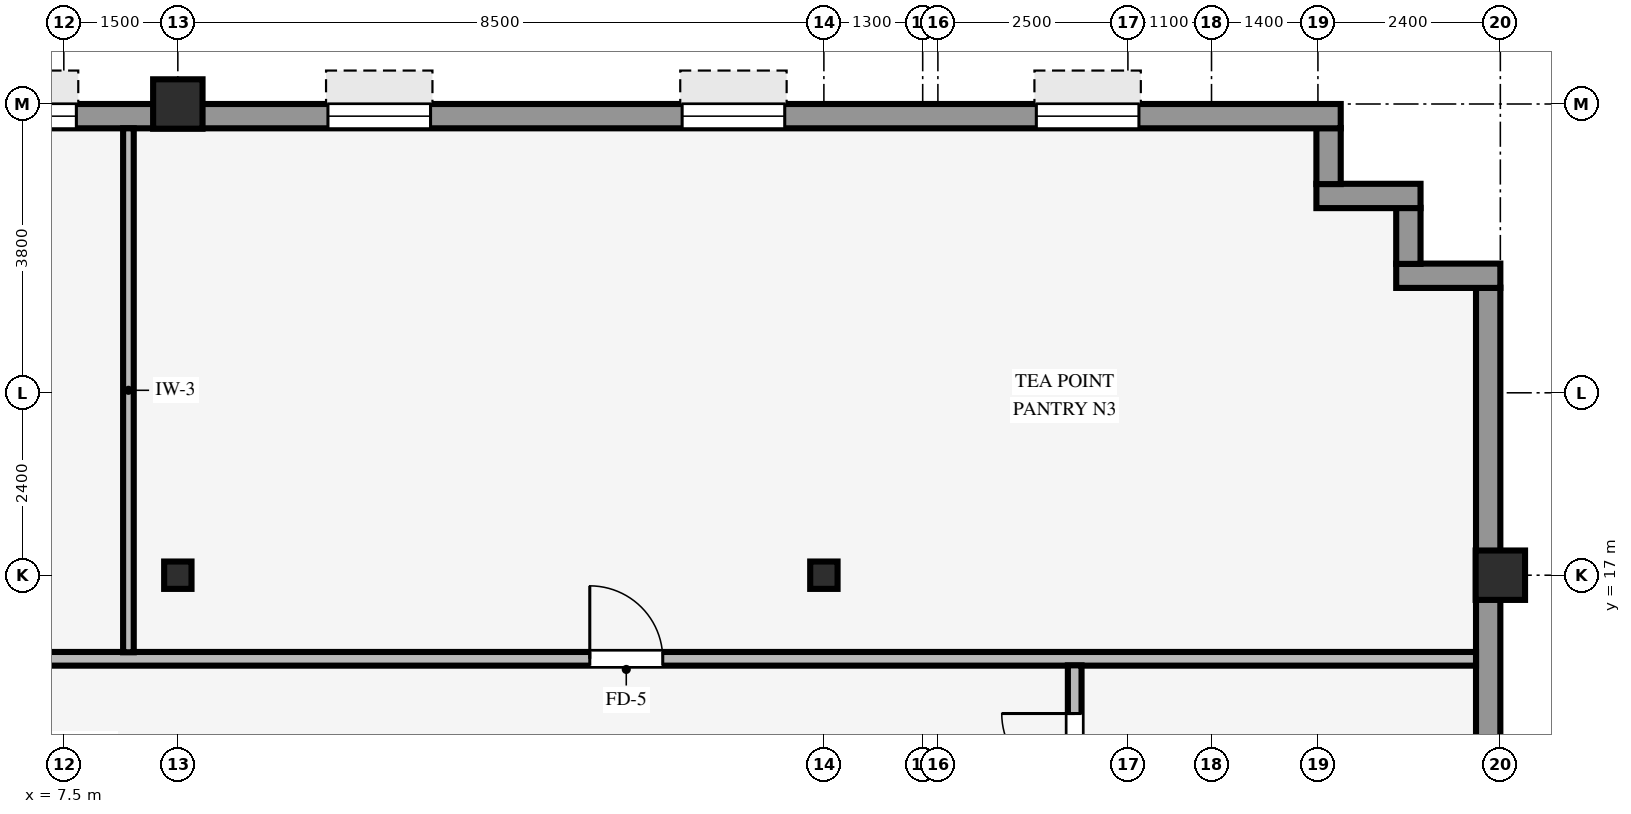
"""IFC4 building model, lengths in metres.
Left out: names, types, materials, properties, quantities, classifications, styles, units other than length and angle.
Written with IfcOpenShell. Run it as: python <this file> out.ifc"""

import sys

from ifc_helpers import new_model, si_unit, direction, frame, frame_2d, origin, origin_2d, place, context, subcontext, project, spatial, rectangle, hollow_rectangle, i_section, extrude, source, transform, mapped, element, fill, save


model = new_model("IFC4")
c1 = context("Model", 3, precision=1e-05, world=origin(), true_north=direction((0.0, 1.0)))
c2 = subcontext(c1, "Body", "Model", "MODEL_VIEW")
j1 = project(units=[si_unit("LENGTHUNIT", "METRE"), si_unit("PLANEANGLEUNIT", "RADIAN")], contexts=[c1])
p1 = place(None, origin())
s1 = spatial("IfcSite", under=j1, at=p1, CompositionType="ELEMENT")
p2 = place(p1, origin())
s2 = spatial("IfcBuilding", under=s1, at=p2, CompositionType="ELEMENT")
p3 = place(p2, frame((0.0, 0.0, 156.7)))
s3 = spatial("IfcBuildingStorey", under=s2, at=p3, CompositionType="ELEMENT", Elevation=156.7)
for number, where, z_axis, x_axis in (
    (1, (26.4, 17.0, 0.0), (0.0, 0.0, 1.0), (1.0, 0.0, 0.0)),
    (2, (9.0, 23.2, 0.0), (0.0, 0.0, 1.0), (1.0, 0.0, 0.0)),
):
    element("IfcColumn", number, at=place(p3, frame(where, z_axis=z_axis, x_axis=x_axis)), inside=s3, PredefinedType="COLUMN", context=c2, shape_type="SweptSolid", body=[
        extrude(hollow_rectangle(XDim=0.65, YDim=0.65, WallThickness=0.04, InnerFilletRadius=0.04, OuterFilletRadius=0.08, at=origin_2d()), origin(), (0.0, 0.0, 1.0), 3.37),
    ])
for number, where, z_axis, x_axis in (
    (3, (9.0, 17.0, 0.0), (0.0, 0.0, 1.0), (1.0, 0.0, 0.0)),
    (4, (17.5, 17.0, 0.0), (0.0, 0.0, 1.0), (1.0, 0.0, 0.0)),
):
    element("IfcColumn", number, at=place(p3, frame(where, z_axis=z_axis, x_axis=x_axis)), inside=s3, PredefinedType="COLUMN", context=c2, shape_type="SweptSolid", body=[
        extrude(i_section(OverallWidth=0.36, OverallDepth=0.36, WebThickness=0.021, FlangeThickness=0.021, FilletRadius=0.018, at=origin_2d()), origin(), (0.0, 0.0, 1.0), 3.37),
    ])
p4 = place(p3, frame((26.24, -20.784, 0.0), z_axis=(0.0, 0.0, 1.0), x_axis=(0.0, 1.0, 0.0)))
e5 = element("IfcWall", 5, at=p4, inside=s3, PredefinedType="STANDARD", context=c2, shape_type="SweptSolid", body=[
    extrude(rectangle(XDim=41.568, YDim=0.32, at=frame_2d((20.784, 0.0))), origin(), (0.0, 0.0, 1.0), 2.705),
])
p5 = place(p4, frame((7.369, 0.0, 0.8)))
e6 = element("IfcOpeningElement", 6, at=p5, cuts=e5, PredefinedType="OPENING", context=c2, shape_type="SweptSolid", body=[
    extrude(rectangle(XDim=2.1, YDim=1.56, at=frame_2d((1.05, 0.78))), frame((0.0, 0.17, 0.0), z_axis=(0.0, -1.0, 0.0), x_axis=(1.0, 0.0, 0.0)), (0.0, 0.0, 1.0), 0.34),
])
p6 = place(p4, frame((12.315, 0.0, 0.8)))
e7 = element("IfcOpeningElement", 7, at=p6, cuts=e5, PredefinedType="OPENING", context=c2, shape_type="SweptSolid", body=[
    extrude(rectangle(XDim=2.1, YDim=1.56, at=frame_2d((1.05, 0.78))), frame((0.0, 0.17, 0.0), z_axis=(0.0, -1.0, 0.0), x_axis=(1.0, 0.0, 0.0)), (0.0, 0.0, 1.0), 0.34),
])
p7 = place(p4, frame((17.261, 0.0, 0.8)))
e8 = element("IfcOpeningElement", 8, at=p7, cuts=e5, PredefinedType="OPENING", context=c2, shape_type="SweptSolid", body=[
    extrude(rectangle(XDim=2.1, YDim=1.56, at=frame_2d((1.05, 0.78))), frame((0.0, 0.17, 0.0), z_axis=(0.0, -1.0, 0.0), x_axis=(1.0, 0.0, 0.0)), (0.0, 0.0, 1.0), 0.34),
])
p8 = place(p4, frame((22.207, 0.0, 0.8)))
e9 = element("IfcOpeningElement", 9, at=p8, cuts=e5, PredefinedType="OPENING", context=c2, shape_type="SweptSolid", body=[
    extrude(rectangle(XDim=2.1, YDim=1.56, at=frame_2d((1.05, 0.78))), frame((0.0, 0.17, 0.0), z_axis=(0.0, -1.0, 0.0), x_axis=(1.0, 0.0, 0.0)), (0.0, 0.0, 1.0), 0.34),
])
p9 = place(p4, frame((27.153, 0.0, 0.8)))
e10 = element("IfcOpeningElement", 10, at=p9, cuts=e5, PredefinedType="OPENING", context=c2, shape_type="SweptSolid", body=[
    extrude(rectangle(XDim=2.1, YDim=1.56, at=frame_2d((1.05, 0.78))), frame((0.0, 0.17, 0.0), z_axis=(0.0, -1.0, 0.0), x_axis=(1.0, 0.0, 0.0)), (0.0, 0.0, 1.0), 0.34),
])
p10 = place(p4, frame((32.099, 0.0, 0.8)))
e11 = element("IfcOpeningElement", 11, at=p10, cuts=e5, PredefinedType="OPENING", context=c2, shape_type="SweptSolid", body=[
    extrude(rectangle(XDim=2.1, YDim=1.56, at=frame_2d((1.05, 0.78))), frame((0.0, 0.17, 0.0), z_axis=(0.0, -1.0, 0.0), x_axis=(1.0, 0.0, 0.0)), (0.0, 0.0, 1.0), 0.34),
])
p11 = place(p3, frame((25.03, 20.94, 0.0), z_axis=(0.0, 0.0, 1.0), x_axis=(1.0, 0.0, 0.0)))
e12 = element("IfcWall", 12, at=p11, inside=s3, PredefinedType="STANDARD", context=c2, shape_type="SweptSolid", body=[
    extrude(rectangle(XDim=1.37, YDim=0.32, at=frame_2d((0.685, 0.0))), origin(), (0.0, 0.0, 1.0), 3.36),
])
p12 = place(p3, frame((25.19, 21.096, 0.0), z_axis=(0.0, 0.0, 1.0), x_axis=(0.0, 1.0, 0.0)))
e13 = element("IfcWall", 13, at=p12, inside=s3, PredefinedType="STANDARD", context=c2, shape_type="SweptSolid", body=[
    extrude(rectangle(XDim=0.738, YDim=0.32, at=frame_2d((0.369, 0.0))), origin(), (0.0, 0.0, 1.0), 3.36),
])
p13 = place(p3, frame((23.98, 21.99, 0.0), z_axis=(0.0, 0.0, 1.0), x_axis=(1.0, 0.0, 0.0)))
e14 = element("IfcWall", 14, at=p13, inside=s3, PredefinedType="STANDARD", context=c2, shape_type="SweptSolid", body=[
    extrude(rectangle(XDim=1.37, YDim=0.32, at=frame_2d((0.685, 0.0))), origin(), (0.0, 0.0, 1.0), 3.36),
])
p14 = place(p3, frame((24.14, 22.146, 0.0), z_axis=(0.0, 0.0, 1.0), x_axis=(0.0, 1.0, 0.0)))
e15 = element("IfcWall", 15, at=p14, inside=s3, PredefinedType="STANDARD", context=c2, shape_type="SweptSolid", body=[
    extrude(rectangle(XDim=0.738, YDim=0.32, at=frame_2d((0.369, 0.0))), origin(), (0.0, 0.0, 1.0), 3.36),
])
p15 = place(p3, frame((-24.3, 23.04, 0.0), z_axis=(0.0, 0.0, 1.0), x_axis=(1.0, 0.0, 0.0)))
e16 = element("IfcWall", 16, at=p15, inside=s3, PredefinedType="STANDARD", context=c2, shape_type="SweptSolid", body=[
    extrude(rectangle(XDim=48.6, YDim=0.32, at=frame_2d((24.3, 0.0))), origin(), (0.0, 0.0, 1.0), 2.705),
])
p16 = place(p15, frame((2.655, 0.0, 0.8)))
e17 = element("IfcOpeningElement", 17, at=p16, cuts=e16, PredefinedType="OPENING", context=c2, shape_type="SweptSolid", body=[
    extrude(rectangle(XDim=1.35, YDim=1.56, at=frame_2d((0.675, 0.78))), frame((0.0, 0.17, 0.0), z_axis=(0.0, -1.0, 0.0), x_axis=(1.0, 0.0, 0.0)), (0.0, 0.0, 1.0), 0.34),
])
p17 = place(p15, frame((7.315, 0.0, 0.8)))
e18 = element("IfcOpeningElement", 18, at=p17, cuts=e16, PredefinedType="OPENING", context=c2, shape_type="SweptSolid", body=[
    extrude(rectangle(XDim=1.35, YDim=1.56, at=frame_2d((0.675, 0.78))), frame((0.0, 0.17, 0.0), z_axis=(0.0, -1.0, 0.0), x_axis=(1.0, 0.0, 0.0)), (0.0, 0.0, 1.0), 0.34),
])
p18 = place(p15, frame((11.975, 0.0, 0.8)))
e19 = element("IfcOpeningElement", 19, at=p18, cuts=e16, PredefinedType="OPENING", context=c2, shape_type="SweptSolid", body=[
    extrude(rectangle(XDim=1.35, YDim=1.56, at=frame_2d((0.675, 0.78))), frame((0.0, 0.17, 0.0), z_axis=(0.0, -1.0, 0.0), x_axis=(1.0, 0.0, 0.0)), (0.0, 0.0, 1.0), 0.34),
])
p19 = place(p15, frame((16.185, 0.0, 0.8)))
e20 = element("IfcOpeningElement", 20, at=p19, cuts=e16, PredefinedType="OPENING", context=c2, shape_type="SweptSolid", body=[
    extrude(rectangle(XDim=1.35, YDim=1.56, at=frame_2d((0.675, 0.78))), frame((0.0, 0.17, 0.0), z_axis=(0.0, -1.0, 0.0), x_axis=(1.0, 0.0, 0.0)), (0.0, 0.0, 1.0), 0.34),
])
p20 = place(p15, frame((21.295, 0.0, 0.8)))
e21 = element("IfcOpeningElement", 21, at=p20, cuts=e16, PredefinedType="OPENING", context=c2, shape_type="SweptSolid", body=[
    extrude(rectangle(XDim=1.35, YDim=1.56, at=frame_2d((0.675, 0.78))), frame((0.0, 0.17, 0.0), z_axis=(0.0, -1.0, 0.0), x_axis=(1.0, 0.0, 0.0)), (0.0, 0.0, 1.0), 0.34),
])
p21 = place(p15, frame((25.955, 0.0, 0.8)))
e22 = element("IfcOpeningElement", 22, at=p21, cuts=e16, PredefinedType="OPENING", context=c2, shape_type="SweptSolid", body=[
    extrude(rectangle(XDim=1.35, YDim=1.56, at=frame_2d((0.675, 0.78))), frame((0.0, 0.17, 0.0), z_axis=(0.0, -1.0, 0.0), x_axis=(1.0, 0.0, 0.0)), (0.0, 0.0, 1.0), 0.34),
])
p22 = place(p15, frame((30.615, 0.0, 0.8)))
e23 = element("IfcOpeningElement", 23, at=p22, cuts=e16, PredefinedType="OPENING", context=c2, shape_type="SweptSolid", body=[
    extrude(rectangle(XDim=1.35, YDim=1.56, at=frame_2d((0.675, 0.78))), frame((0.0, 0.17, 0.0), z_axis=(0.0, -1.0, 0.0), x_axis=(1.0, 0.0, 0.0)), (0.0, 0.0, 1.0), 0.34),
])
p23 = place(p15, frame((35.275, 0.0, 0.8)))
e24 = element("IfcOpeningElement", 24, at=p23, cuts=e16, PredefinedType="OPENING", context=c2, shape_type="SweptSolid", body=[
    extrude(rectangle(XDim=1.35, YDim=1.56, at=frame_2d((0.675, 0.78))), frame((0.0, 0.17, 0.0), z_axis=(0.0, -1.0, 0.0), x_axis=(1.0, 0.0, 0.0)), (0.0, 0.0, 1.0), 0.34),
])
p24 = place(p15, frame((39.935, 0.0, 0.8)))
e25 = element("IfcOpeningElement", 25, at=p24, cuts=e16, PredefinedType="OPENING", context=c2, shape_type="SweptSolid", body=[
    extrude(rectangle(XDim=1.35, YDim=1.56, at=frame_2d((0.675, 0.78))), frame((0.0, 0.17, 0.0), z_axis=(0.0, -1.0, 0.0), x_axis=(1.0, 0.0, 0.0)), (0.0, 0.0, 1.0), 0.34),
])
p25 = place(p15, frame((44.595, 0.0, 0.8)))
e26 = element("IfcOpeningElement", 26, at=p25, cuts=e16, PredefinedType="OPENING", context=c2, shape_type="SweptSolid", body=[
    extrude(rectangle(XDim=1.35, YDim=1.56, at=frame_2d((0.675, 0.78))), frame((0.0, 0.17, 0.0), z_axis=(0.0, -1.0, 0.0), x_axis=(1.0, 0.0, 0.0)), (0.0, 0.0, 1.0), 0.34),
])
p26 = place(p3, frame((-26.08, 15.9, 0.0), z_axis=(0.0, 0.0, 1.0), x_axis=(1.0, 0.0, 0.0)))
e27 = element("IfcWall", 27, at=p26, inside=s3, PredefinedType="PARTITIONING", context=c2, shape_type="SweptSolid", body=[
    extrude(rectangle(XDim=52.16, YDim=0.18, at=frame_2d((26.08, 0.0))), origin(), (0.0, 0.0, 1.0), 3.36),
])
p27 = place(p26, frame((26.72, 0.0, 0.0)))
e28 = element("IfcOpeningElement", 28, at=p27, cuts=e27, PredefinedType="OPENING", context=c2, shape_type="SweptSolid", body=[
    extrude(rectangle(XDim=0.96, YDim=2.1, at=frame_2d((0.48, 1.05))), frame((0.0, 0.1, 0.0), z_axis=(0.0, -1.0, 0.0), x_axis=(1.0, 0.0, 0.0)), (0.0, 0.0, 1.0), 0.2),
])
p28 = place(p26, frame((40.5, 0.0, 0.0)))
e29 = element("IfcOpeningElement", 29, at=p28, cuts=e27, PredefinedType="OPENING", context=c2, shape_type="SweptSolid", body=[
    extrude(rectangle(XDim=0.96, YDim=2.1, at=frame_2d((0.48, 1.05))), frame((0.0, 0.1, 0.0), z_axis=(0.0, -1.0, 0.0), x_axis=(1.0, 0.0, 0.0)), (0.0, 0.0, 1.0), 0.2),
])
p29 = place(p26, frame((13.61, 0.0, 0.0)))
e30 = element("IfcOpeningElement", 30, at=p29, cuts=e27, PredefinedType="OPENING", context=c2, shape_type="SweptSolid", body=[
    extrude(rectangle(XDim=0.96, YDim=2.1, at=frame_2d((0.48, 1.05))), frame((0.0, 0.1, 0.0), z_axis=(0.0, -1.0, 0.0), x_axis=(1.0, 0.0, 0.0)), (0.0, 0.0, 1.0), 0.2),
])
p30 = place(p3, frame((8.35, 15.986, 0.0), z_axis=(0.0, 0.0, 1.0), x_axis=(0.0, 1.0, 0.0)))
e31 = element("IfcWall", 31, at=p30, inside=s3, PredefinedType="PARTITIONING", context=c2, shape_type="SweptSolid", body=[
    extrude(rectangle(XDim=6.894, YDim=0.14, at=frame_2d((3.447, 0.0))), origin(), (0.0, 0.0, 1.0), 3.36),
])
p31 = place(p3, frame((20.8, 13.586, 0.0), z_axis=(0.0, 0.0, 1.0), x_axis=(0.0, 1.0, 0.0)))
e32 = element("IfcWall", 32, at=p31, inside=s3, PredefinedType="PARTITIONING", context=c2, shape_type="SweptSolid", body=[
    extrude(rectangle(XDim=2.228, YDim=0.18, at=frame_2d((1.114, 0.0))), origin(), (0.0, 0.0, 1.0), 3.36),
])
p32 = place(p31, frame((0.634, 0.0, 0.0)))
e33 = element("IfcOpeningElement", 33, at=p32, cuts=e32, PredefinedType="OPENING", context=c2, shape_type="SweptSolid", body=[
    extrude(rectangle(XDim=0.96, YDim=2.1, at=frame_2d((0.48, 1.05))), frame((0.0, 0.1, 0.0), z_axis=(0.0, -1.0, 0.0), x_axis=(1.0, 0.0, 0.0)), (0.0, 0.0, 1.0), 0.2),
])
m1 = source(origin(), c2, "Body", "SweptSolid", [
    extrude(rectangle(XDim=1.35, YDim=1.56, at=frame_2d((0.675, 0.78))), frame((0.0, 0.03, 0.0), z_axis=(0.0, -1.0, 0.0), x_axis=(1.0, 0.0, 0.0)), (0.0, 0.0, 1.0), 0.06),
])
p33 = place(p22, origin())
e34 = element("IfcWindow", 34, at=p33, inside=s3, PartitioningType="SINGLE_PANEL", PredefinedType="WINDOW", context=c2, shape_type="MappedRepresentation", body=[
    mapped(m1, transform((0.0, 0.0, 0.0), scale=1.0)),
])
fill(e23, e34)
p34 = place(p23, origin())
e35 = element("IfcWindow", 35, at=p34, inside=s3, PartitioningType="SINGLE_PANEL", PredefinedType="WINDOW", context=c2, shape_type="MappedRepresentation", body=[
    mapped(m1, transform((0.0, 0.0, 0.0), scale=1.0)),
])
fill(e24, e35)
p35 = place(p24, origin())
e36 = element("IfcWindow", 36, at=p35, inside=s3, PartitioningType="SINGLE_PANEL", PredefinedType="WINDOW", context=c2, shape_type="MappedRepresentation", body=[
    mapped(m1, transform((0.0, 0.0, 0.0), scale=1.0)),
])
fill(e25, e36)
p36 = place(p25, origin())
e37 = element("IfcWindow", 37, at=p36, inside=s3, PartitioningType="SINGLE_PANEL", PredefinedType="WINDOW", context=c2, shape_type="MappedRepresentation", body=[
    mapped(m1, transform((0.0, 0.0, 0.0), scale=1.0)),
])
fill(e26, e37)
m2 = source(origin(), c2, "Body", "SweptSolid", [
    extrude(rectangle(XDim=0.96, YDim=2.1, at=frame_2d((0.48, 1.05))), frame((0.0, 0.025, 0.0), z_axis=(0.0, -1.0, 0.0), x_axis=(1.0, 0.0, 0.0)), (0.0, 0.0, 1.0), 0.05),
])
p37 = place(p28, origin())
e38 = element("IfcDoor", 38, at=p37, inside=s3, OperationType="SINGLE_SWING_LEFT", PredefinedType="DOOR", context=c2, shape_type="MappedRepresentation", body=[
    mapped(m2, transform((0.0, 0.0, 0.0), scale=1.0)),
])
fill(e29, e38)
p38 = place(p32, origin())
e39 = element("IfcDoor", 39, at=p38, inside=s3, OperationType="SINGLE_SWING_RIGHT", PredefinedType="DOOR", context=c2, shape_type="MappedRepresentation", body=[
    mapped(m2, transform((0.0, 0.0, 0.0), scale=1.0)),
])
fill(e33, e39)
save(model, sys.argv[1])
